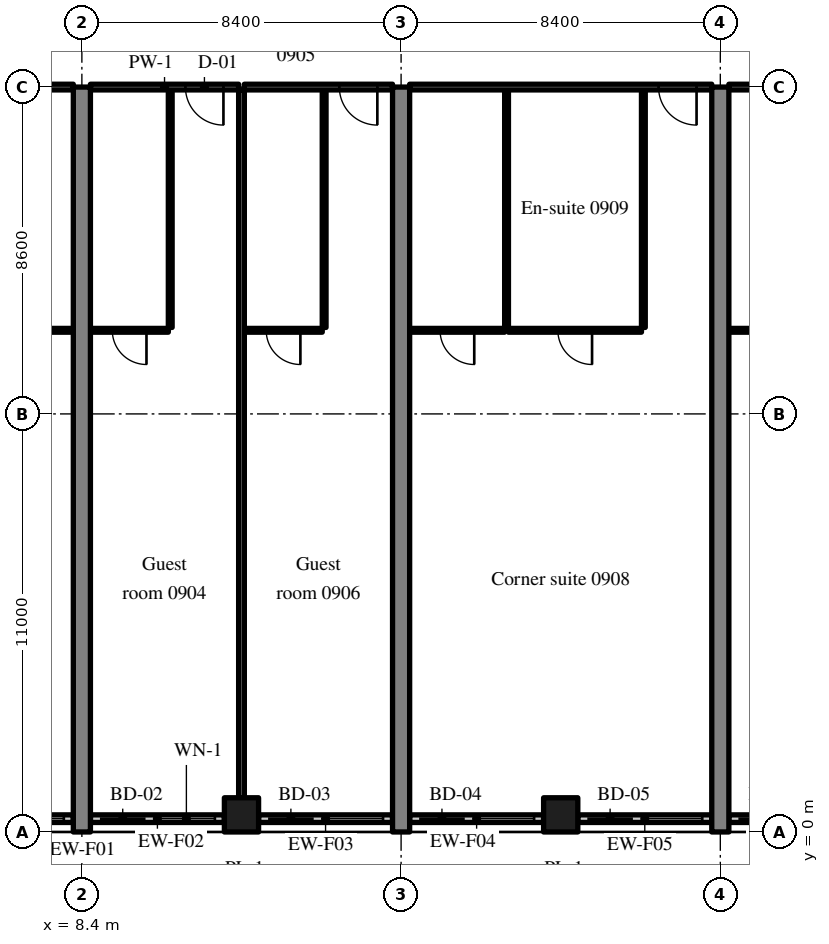
"""IFC4 building model, lengths in metres.
Left out: names, types, materials, properties, quantities, classifications, styles, units other than length and angle.
Written with IfcOpenShell. Run it as: python <this file> out.ifc"""

import sys

from ifc_helpers import new_model, si_unit, direction, frame, frame_2d, origin, origin_2d, place, context, subcontext, project, spatial, rectangle, extrude, source, transform, mapped, element, fill, save


model = new_model("IFC4")
c1 = context("Model", 3, precision=1e-05, world=origin(), true_north=direction((0.0, 1.0)))
c2 = subcontext(c1, "Body", "Model", "MODEL_VIEW")
j1 = project(units=[si_unit("LENGTHUNIT", "METRE"), si_unit("PLANEANGLEUNIT", "RADIAN")], contexts=[c1])
p1 = place(None, origin())
s1 = spatial("IfcSite", under=j1, at=p1, CompositionType="ELEMENT")
p2 = place(p1, origin())
s2 = spatial("IfcBuilding", under=s1, at=p2, CompositionType="ELEMENT")
p3 = place(p2, frame((0.0, 0.0, 43.0)))
s3 = spatial("IfcBuildingStorey", under=s2, at=p3, CompositionType="ELEMENT", Elevation=43.0)
m1 = source(origin(), c2, "Body", "SweptSolid", [
    extrude(rectangle(XDim=19.6, YDim=0.45, at=frame_2d((9.8, 0.0))), origin(), (0.0, 0.0, 1.0), 3.52),
])
for number, where, z_axis, x_axis in (
    (1, (8.4, 0.0, 0.0), (0.0, 0.0, 1.0), (0.0, 1.0, 0.0)),
    (2, (16.8, 0.0, 0.0), (0.0, 0.0, 1.0), (0.0, 1.0, 0.0)),
    (3, (25.2, 0.0, 0.0), (0.0, 0.0, 1.0), (0.0, 1.0, 0.0)),
):
    element("IfcWall", number, at=place(p3, frame(where, z_axis=z_axis, x_axis=x_axis)), inside=s3, PredefinedType="SHEAR", context=c2, shape_type="MappedRepresentation", body=[
        mapped(m1, transform((0.0, 0.0, 0.0), scale=1.0)),
    ])
m2 = source(origin(), c2, "Body", "SweptSolid", [
    extrude(rectangle(XDim=0.9, YDim=0.9, at=origin_2d()), origin(), (0.0, 0.0, 1.0), 3.52),
])
for number, where, z_axis, x_axis in (
    (4, (12.6, 0.45, 0.0), (0.0, 0.0, 1.0), (1.0, 0.0, 0.0)),
    (5, (21.0, 0.45, 0.0), (0.0, 0.0, 1.0), (1.0, 0.0, 0.0)),
):
    element("IfcColumn", number, at=place(p3, frame(where, z_axis=z_axis, x_axis=x_axis)), inside=s3, PredefinedType="COLUMN", context=c2, shape_type="MappedRepresentation", body=[
        mapped(m2, transform((0.0, 0.0, 0.0), scale=1.0)),
    ])
m3 = source(origin(), c2, "Body", "SweptSolid", [
    extrude(rectangle(XDim=4.03, YDim=0.2, at=frame_2d((2.015, 0.0))), origin(), (0.0, 0.0, 1.0), 2.82),
])
p4 = place(p3, frame((4.145, 0.35, 0.0), z_axis=(0.0, 0.0, 1.0), x_axis=(1.0, 0.0, 0.0)))
e6 = element("IfcWall", 6, at=p4, inside=s3, PredefinedType="SOLIDWALL", context=c2, shape_type="MappedRepresentation", body=[
    mapped(m3, transform((0.0, 0.0, 0.0), scale=1.0)),
])
m4 = source(origin(), c2, "Body", "SweptSolid", [
    extrude(rectangle(XDim=1.2, YDim=2.4, at=frame_2d((0.6, 1.2))), frame((0.0, 0.11, 0.0), z_axis=(0.0, -1.0, 0.0), x_axis=(1.0, 0.0, 0.0)), (0.0, 0.0, 1.0), 0.22),
])
p5 = place(p4, frame((0.25, 0.0, 0.0)))
e7 = element("IfcOpeningElement", 7, at=p5, cuts=e6, PredefinedType="OPENING", context=c2, shape_type="MappedRepresentation", body=[
    mapped(m4, transform((0.0, 0.0, 0.0), scale=1.0)),
])
m5 = source(origin(), c2, "Body", "SweptSolid", [
    extrude(rectangle(XDim=1.5, YDim=1.5, at=frame_2d((0.75, 0.75))), frame((0.0, 0.11, 0.0), z_axis=(0.0, -1.0, 0.0), x_axis=(1.0, 0.0, 0.0)), (0.0, 0.0, 1.0), 0.22),
])
p6 = place(p4, frame((2.28, 0.0, 0.9)))
e8 = element("IfcOpeningElement", 8, at=p6, cuts=e6, PredefinedType="OPENING", context=c2, shape_type="MappedRepresentation", body=[
    mapped(m5, transform((0.0, 0.0, 0.0), scale=1.0)),
])
m6 = source(origin(), c2, "Body", "SweptSolid", [
    extrude(rectangle(XDim=3.525, YDim=0.2, at=frame_2d((1.762, 0.0))), origin(), (0.0, 0.0, 1.0), 2.82),
])
p7 = place(p3, frame((8.625, 0.35, 0.0), z_axis=(0.0, 0.0, 1.0), x_axis=(1.0, 0.0, 0.0)))
e9 = element("IfcWall", 9, at=p7, inside=s3, PredefinedType="SOLIDWALL", context=c2, shape_type="MappedRepresentation", body=[
    mapped(m6, transform((0.0, 0.0, 0.0), scale=1.0)),
])
p8 = place(p7, frame((0.25, 0.0, 0.0)))
e10 = element("IfcOpeningElement", 10, at=p8, cuts=e9, PredefinedType="OPENING", context=c2, shape_type="MappedRepresentation", body=[
    mapped(m4, transform((0.0, 0.0, 0.0), scale=1.0)),
])
p9 = place(p7, frame((1.775, 0.0, 0.9)))
e11 = element("IfcOpeningElement", 11, at=p9, cuts=e9, PredefinedType="OPENING", context=c2, shape_type="MappedRepresentation", body=[
    mapped(m5, transform((0.0, 0.0, 0.0), scale=1.0)),
])
p10 = place(p3, frame((13.05, 0.35, 0.0), z_axis=(0.0, 0.0, 1.0), x_axis=(1.0, 0.0, 0.0)))
e12 = element("IfcWall", 12, at=p10, inside=s3, PredefinedType="SOLIDWALL", context=c2, shape_type="MappedRepresentation", body=[
    mapped(m6, transform((0.0, 0.0, 0.0), scale=1.0)),
])
p11 = place(p10, frame((0.25, 0.0, 0.0)))
e13 = element("IfcOpeningElement", 13, at=p11, cuts=e12, PredefinedType="OPENING", context=c2, shape_type="MappedRepresentation", body=[
    mapped(m4, transform((0.0, 0.0, 0.0), scale=1.0)),
])
p12 = place(p10, frame((1.775, 0.0, 0.9)))
e14 = element("IfcOpeningElement", 14, at=p12, cuts=e12, PredefinedType="OPENING", context=c2, shape_type="MappedRepresentation", body=[
    mapped(m5, transform((0.0, 0.0, 0.0), scale=1.0)),
])
m7 = source(origin(), c2, "Body", "SweptSolid", [
    extrude(rectangle(XDim=3.525, YDim=0.2, at=frame_2d((1.763, 0.0))), origin(), (0.0, 0.0, 1.0), 2.82),
])
p13 = place(p3, frame((17.025, 0.35, 0.0), z_axis=(0.0, 0.0, 1.0), x_axis=(1.0, 0.0, 0.0)))
e15 = element("IfcWall", 15, at=p13, inside=s3, PredefinedType="SOLIDWALL", context=c2, shape_type="MappedRepresentation", body=[
    mapped(m7, transform((0.0, 0.0, 0.0), scale=1.0)),
])
p14 = place(p13, frame((0.25, 0.0, 0.0)))
e16 = element("IfcOpeningElement", 16, at=p14, cuts=e15, PredefinedType="OPENING", context=c2, shape_type="MappedRepresentation", body=[
    mapped(m4, transform((0.0, 0.0, 0.0), scale=1.0)),
])
p15 = place(p13, frame((1.775, 0.0, 0.9)))
e17 = element("IfcOpeningElement", 17, at=p15, cuts=e15, PredefinedType="OPENING", context=c2, shape_type="MappedRepresentation", body=[
    mapped(m5, transform((0.0, 0.0, 0.0), scale=1.0)),
])
p16 = place(p3, frame((21.45, 0.35, 0.0), z_axis=(0.0, 0.0, 1.0), x_axis=(1.0, 0.0, 0.0)))
e18 = element("IfcWall", 18, at=p16, inside=s3, PredefinedType="SOLIDWALL", context=c2, shape_type="MappedRepresentation", body=[
    mapped(m7, transform((0.0, 0.0, 0.0), scale=1.0)),
])
p17 = place(p16, frame((0.25, 0.0, 0.0)))
e19 = element("IfcOpeningElement", 19, at=p17, cuts=e18, PredefinedType="OPENING", context=c2, shape_type="MappedRepresentation", body=[
    mapped(m4, transform((0.0, 0.0, 0.0), scale=1.0)),
])
p18 = place(p16, frame((1.775, 0.0, 0.9)))
e20 = element("IfcOpeningElement", 20, at=p18, cuts=e18, PredefinedType="OPENING", context=c2, shape_type="MappedRepresentation", body=[
    mapped(m5, transform((0.0, 0.0, 0.0), scale=1.0)),
])
p19 = place(p3, frame((25.425, 0.35, 0.0), z_axis=(0.0, 0.0, 1.0), x_axis=(1.0, 0.0, 0.0)))
e21 = element("IfcWall", 21, at=p19, inside=s3, PredefinedType="SOLIDWALL", context=c2, shape_type="MappedRepresentation", body=[
    mapped(m6, transform((0.0, 0.0, 0.0), scale=1.0)),
])
p20 = place(p19, frame((0.25, 0.0, 0.0)))
e22 = element("IfcOpeningElement", 22, at=p20, cuts=e21, PredefinedType="OPENING", context=c2, shape_type="MappedRepresentation", body=[
    mapped(m4, transform((0.0, 0.0, 0.0), scale=1.0)),
])
p21 = place(p19, frame((1.775, 0.0, 0.9)))
e23 = element("IfcOpeningElement", 23, at=p21, cuts=e21, PredefinedType="OPENING", context=c2, shape_type="MappedRepresentation", body=[
    mapped(m5, transform((0.0, 0.0, 0.0), scale=1.0)),
])
m8 = source(origin(), c2, "Body", "SweptSolid", [
    extrude(rectangle(XDim=2.275, YDim=0.1, at=frame_2d((1.138, 0.0))), origin(), (0.0, 0.0, 1.0), 3.52),
])
p22 = place(p3, frame((5.9, 13.2, 0.0), z_axis=(0.0, 0.0, 1.0), x_axis=(1.0, 0.0, 0.0)))
e24 = element("IfcWall", 24, at=p22, inside=s3, PredefinedType="PARTITIONING", context=c2, shape_type="MappedRepresentation", body=[
    mapped(m8, transform((0.0, 0.0, 0.0), scale=1.0)),
])
m9 = source(origin(), c2, "Body", "SweptSolid", [
    extrude(rectangle(XDim=0.9, YDim=2.1, at=frame_2d((0.45, 1.05))), frame((0.0, 0.06, 0.0), z_axis=(0.0, -1.0, 0.0), x_axis=(1.0, 0.0, 0.0)), (0.0, 0.0, 1.0), 0.12),
])
p23 = place(p22, frame((0.687, 0.0, 0.0)))
e25 = element("IfcOpeningElement", 25, at=p23, cuts=e24, PredefinedType="OPENING", context=c2, shape_type="MappedRepresentation", body=[
    mapped(m9, transform((0.0, 0.0, 0.0), scale=1.0)),
])
m10 = source(origin(), c2, "Body", "SweptSolid", [
    extrude(rectangle(XDim=7.725, YDim=0.15, at=frame_2d((3.863, 0.0))), origin(), (0.0, 0.0, 1.0), 2.82),
])
p24 = place(p3, frame((0.45, 19.6, 0.0), z_axis=(0.0, 0.0, 1.0), x_axis=(1.0, 0.0, 0.0)))
e26 = element("IfcWall", 26, at=p24, inside=s3, PredefinedType="PARTITIONING", context=c2, shape_type="MappedRepresentation", body=[
    mapped(m10, transform((0.0, 0.0, 0.0), scale=1.0)),
])
m11 = source(origin(), c2, "Body", "SweptSolid", [
    extrude(rectangle(XDim=1.0, YDim=2.1, at=frame_2d((0.5, 1.05))), frame((0.0, 0.085, 0.0), z_axis=(0.0, -1.0, 0.0), x_axis=(1.0, 0.0, 0.0)), (0.0, 0.0, 1.0), 0.17),
])
p25 = place(p24, frame((0.4, 0.0, 0.0)))
e27 = element("IfcOpeningElement", 27, at=p25, cuts=e26, PredefinedType="OPENING", context=c2, shape_type="MappedRepresentation", body=[
    mapped(m11, transform((0.0, 0.0, 0.0), scale=1.0)),
])
m12 = source(origin(), c2, "Body", "SweptSolid", [
    extrude(rectangle(XDim=6.25, YDim=0.1, at=frame_2d((3.125, 0.0))), origin(), (0.0, 0.0, 1.0), 3.52),
])
p26 = place(p3, frame((10.725, 13.275, 0.0), z_axis=(0.0, 0.0, 1.0), x_axis=(0.0, 1.0, 0.0)))
e28 = element("IfcWall", 28, at=p26, inside=s3, PredefinedType="PARTITIONING", context=c2, shape_type="MappedRepresentation", body=[
    mapped(m12, transform((0.0, 0.0, 0.0), scale=1.0)),
])
m13 = source(origin(), c2, "Body", "SweptSolid", [
    extrude(rectangle(XDim=2.05, YDim=0.1, at=frame_2d((1.025, 0.0))), origin(), (0.0, 0.0, 1.0), 3.52),
])
p27 = place(p3, frame((8.625, 13.2, 0.0), z_axis=(0.0, 0.0, 1.0), x_axis=(1.0, 0.0, 0.0)))
e29 = element("IfcWall", 29, at=p27, inside=s3, PredefinedType="PARTITIONING", context=c2, shape_type="MappedRepresentation", body=[
    mapped(m13, transform((0.0, 0.0, 0.0), scale=1.0)),
])
p28 = place(p27, frame((0.575, 0.0, 0.0)))
e30 = element("IfcOpeningElement", 30, at=p28, cuts=e29, PredefinedType="OPENING", context=c2, shape_type="MappedRepresentation", body=[
    mapped(m9, transform((0.0, 0.0, 0.0), scale=1.0)),
])
m14 = source(origin(), c2, "Body", "SweptSolid", [
    extrude(rectangle(XDim=3.9, YDim=0.15, at=frame_2d((1.95, 0.0))), origin(), (0.0, 0.0, 1.0), 2.82),
])
p29 = place(p3, frame((8.625, 19.6, 0.0), z_axis=(0.0, 0.0, 1.0), x_axis=(1.0, 0.0, 0.0)))
e31 = element("IfcWall", 31, at=p29, inside=s3, PredefinedType="PARTITIONING", context=c2, shape_type="MappedRepresentation", body=[
    mapped(m14, transform((0.0, 0.0, 0.0), scale=1.0)),
])
p30 = place(p29, frame((2.5, 0.0, 0.0)))
e32 = element("IfcOpeningElement", 32, at=p30, cuts=e31, PredefinedType="OPENING", context=c2, shape_type="MappedRepresentation", body=[
    mapped(m11, transform((0.0, 0.0, 0.0), scale=1.0)),
])
p31 = place(p3, frame((14.775, 13.275, 0.0), z_axis=(0.0, 0.0, 1.0), x_axis=(0.0, 1.0, 0.0)))
e33 = element("IfcWall", 33, at=p31, inside=s3, PredefinedType="PARTITIONING", context=c2, shape_type="MappedRepresentation", body=[
    mapped(m12, transform((0.0, 0.0, 0.0), scale=1.0)),
])
p32 = place(p3, frame((12.675, 13.2, 0.0), z_axis=(0.0, 0.0, 1.0), x_axis=(1.0, 0.0, 0.0)))
e34 = element("IfcWall", 34, at=p32, inside=s3, PredefinedType="PARTITIONING", context=c2, shape_type="MappedRepresentation", body=[
    mapped(m13, transform((0.0, 0.0, 0.0), scale=1.0)),
])
p33 = place(p32, frame((0.575, 0.0, 0.0)))
e35 = element("IfcOpeningElement", 35, at=p33, cuts=e34, PredefinedType="OPENING", context=c2, shape_type="MappedRepresentation", body=[
    mapped(m9, transform((0.0, 0.0, 0.0), scale=1.0)),
])
p34 = place(p3, frame((12.675, 19.6, 0.0), z_axis=(0.0, 0.0, 1.0), x_axis=(1.0, 0.0, 0.0)))
e36 = element("IfcWall", 36, at=p34, inside=s3, PredefinedType="PARTITIONING", context=c2, shape_type="MappedRepresentation", body=[
    mapped(m14, transform((0.0, 0.0, 0.0), scale=1.0)),
])
p35 = place(p34, frame((2.5, 0.0, 0.0)))
e37 = element("IfcOpeningElement", 37, at=p35, cuts=e36, PredefinedType="OPENING", context=c2, shape_type="MappedRepresentation", body=[
    mapped(m11, transform((0.0, 0.0, 0.0), scale=1.0)),
])
m15 = source(origin(), c2, "Body", "SweptSolid", [
    extrude(rectangle(XDim=18.625, YDim=0.15, at=frame_2d((9.312, 0.0))), origin(), (0.0, 0.0, 1.0), 3.52),
])
p36 = place(p3, frame((12.6, 0.9, 0.0), z_axis=(0.0, 0.0, 1.0), x_axis=(0.0, 1.0, 0.0)))
e38 = element("IfcWall", 38, at=p36, inside=s3, PredefinedType="PARTITIONING", context=c2, shape_type="MappedRepresentation", body=[
    mapped(m15, transform((0.0, 0.0, 0.0), scale=1.0)),
])
for number, where, z_axis, x_axis in (
    (39, (23.175, 13.275, 0.0), (0.0, 0.0, 1.0), (0.0, 1.0, 0.0)),
    (40, (19.575, 13.275, 0.0), (0.0, 0.0, 1.0), (0.0, 1.0, 0.0)),
):
    element("IfcWall", number, at=place(p3, frame(where, z_axis=z_axis, x_axis=x_axis)), inside=s3, PredefinedType="PARTITIONING", context=c2, shape_type="MappedRepresentation", body=[
        mapped(m12, transform((0.0, 0.0, 0.0), scale=1.0)),
    ])
m16 = source(origin(), c2, "Body", "SweptSolid", [
    extrude(rectangle(XDim=3.5, YDim=0.1, at=frame_2d((1.75, 0.0))), origin(), (0.0, 0.0, 1.0), 3.52),
])
p37 = place(p3, frame((19.625, 13.2, 0.0), z_axis=(0.0, 0.0, 1.0), x_axis=(1.0, 0.0, 0.0)))
e41 = element("IfcWall", 41, at=p37, inside=s3, PredefinedType="PARTITIONING", context=c2, shape_type="MappedRepresentation", body=[
    mapped(m16, transform((0.0, 0.0, 0.0), scale=1.0)),
])
p38 = place(p37, frame((1.3, 0.0, 0.0)))
e42 = element("IfcOpeningElement", 42, at=p38, cuts=e41, PredefinedType="OPENING", context=c2, shape_type="MappedRepresentation", body=[
    mapped(m9, transform((0.0, 0.0, 0.0), scale=1.0)),
])
m17 = source(origin(), c2, "Body", "SweptSolid", [
    extrude(rectangle(XDim=2.5, YDim=0.1, at=frame_2d((1.25, 0.0))), origin(), (0.0, 0.0, 1.0), 3.52),
])
p39 = place(p3, frame((17.025, 13.2, 0.0), z_axis=(0.0, 0.0, 1.0), x_axis=(1.0, 0.0, 0.0)))
e43 = element("IfcWall", 43, at=p39, inside=s3, PredefinedType="PARTITIONING", context=c2, shape_type="MappedRepresentation", body=[
    mapped(m17, transform((0.0, 0.0, 0.0), scale=1.0)),
])
p40 = place(p39, frame((0.8, 0.0, 0.0)))
e44 = element("IfcOpeningElement", 44, at=p40, cuts=e43, PredefinedType="OPENING", context=c2, shape_type="MappedRepresentation", body=[
    mapped(m9, transform((0.0, 0.0, 0.0), scale=1.0)),
])
m18 = source(origin(), c2, "Body", "SweptSolid", [
    extrude(rectangle(XDim=7.95, YDim=0.15, at=frame_2d((3.975, 0.0))), origin(), (0.0, 0.0, 1.0), 2.82),
])
p41 = place(p3, frame((17.025, 19.6, 0.0), z_axis=(0.0, 0.0, 1.0), x_axis=(1.0, 0.0, 0.0)))
e45 = element("IfcWall", 45, at=p41, inside=s3, PredefinedType="PARTITIONING", context=c2, shape_type="MappedRepresentation", body=[
    mapped(m18, transform((0.0, 0.0, 0.0), scale=1.0)),
])
p42 = place(p41, frame((6.55, 0.0, 0.0)))
e46 = element("IfcOpeningElement", 46, at=p42, cuts=e45, PredefinedType="OPENING", context=c2, shape_type="MappedRepresentation", body=[
    mapped(m11, transform((0.0, 0.0, 0.0), scale=1.0)),
])
p43 = place(p3, frame((25.425, 13.2, 0.0), z_axis=(0.0, 0.0, 1.0), x_axis=(1.0, 0.0, 0.0)))
e47 = element("IfcWall", 47, at=p43, inside=s3, PredefinedType="PARTITIONING", context=c2, shape_type="MappedRepresentation", body=[
    mapped(m17, transform((0.0, 0.0, 0.0), scale=1.0)),
])
p44 = place(p43, frame((0.8, 0.0, 0.0)))
e48 = element("IfcOpeningElement", 48, at=p44, cuts=e47, PredefinedType="OPENING", context=c2, shape_type="MappedRepresentation", body=[
    mapped(m9, transform((0.0, 0.0, 0.0), scale=1.0)),
])
m19 = source(origin(), c2, "Body", "SweptSolid", [
    extrude(rectangle(XDim=7.95, YDim=0.15, at=frame_2d((3.975, 0.0))), origin(), (0.0, 0.0, 1.0), 2.82),
])
p45 = place(p3, frame((25.425, 19.6, 0.0), z_axis=(0.0, 0.0, 1.0), x_axis=(1.0, 0.0, 0.0)))
e49 = element("IfcWall", 49, at=p45, inside=s3, PredefinedType="PARTITIONING", context=c2, shape_type="MappedRepresentation", body=[
    mapped(m19, transform((0.0, 0.0, 0.0), scale=1.0)),
])
p46 = place(p45, frame((6.55, 0.0, 0.0)))
e50 = element("IfcOpeningElement", 50, at=p46, cuts=e49, PredefinedType="OPENING", context=c2, shape_type="MappedRepresentation", body=[
    mapped(m11, transform((0.0, 0.0, 0.0), scale=1.0)),
])
m20 = source(origin(), c2, "Body", "SweptSolid", [
    extrude(rectangle(XDim=1.5, YDim=1.5, at=frame_2d((0.75, 0.75))), frame((0.0, 0.03, 0.0), z_axis=(0.0, -1.0, 0.0), x_axis=(1.0, 0.0, 0.0)), (0.0, 0.0, 1.0), 0.06),
])
p47 = place(p6, origin())
e51 = element("IfcWindow", 51, at=p47, inside=s3, PartitioningType="SINGLE_PANEL", PredefinedType="WINDOW", context=c2, shape_type="MappedRepresentation", body=[
    mapped(m20, transform((0.0, 0.0, 0.0), scale=1.0)),
])
fill(e8, e51)
m21 = source(origin(), c2, "Body", "SweptSolid", [
    extrude(rectangle(XDim=1.2, YDim=2.4, at=frame_2d((0.6, 1.2))), frame((0.0, 0.025, 0.0), z_axis=(0.0, -1.0, 0.0), x_axis=(1.0, 0.0, 0.0)), (0.0, 0.0, 1.0), 0.05),
])
p48 = place(p8, origin())
e52 = element("IfcDoor", 52, at=p48, inside=s3, OperationType="SLIDING_TO_RIGHT", PredefinedType="DOOR", context=c2, shape_type="MappedRepresentation", body=[
    mapped(m21, transform((0.0, 0.0, 0.0), scale=1.0)),
])
fill(e10, e52)
p49 = place(p9, origin())
e53 = element("IfcWindow", 53, at=p49, inside=s3, PartitioningType="SINGLE_PANEL", PredefinedType="WINDOW", context=c2, shape_type="MappedRepresentation", body=[
    mapped(m20, transform((0.0, 0.0, 0.0), scale=1.0)),
])
fill(e11, e53)
p50 = place(p11, origin())
e54 = element("IfcDoor", 54, at=p50, inside=s3, OperationType="SLIDING_TO_LEFT", PredefinedType="DOOR", context=c2, shape_type="MappedRepresentation", body=[
    mapped(m21, transform((0.0, 0.0, 0.0), scale=1.0)),
])
fill(e13, e54)
p51 = place(p12, origin())
e55 = element("IfcWindow", 55, at=p51, inside=s3, PartitioningType="SINGLE_PANEL", PredefinedType="WINDOW", context=c2, shape_type="MappedRepresentation", body=[
    mapped(m20, transform((0.0, 0.0, 0.0), scale=1.0)),
])
fill(e14, e55)
p52 = place(p14, origin())
e56 = element("IfcDoor", 56, at=p52, inside=s3, OperationType="SLIDING_TO_RIGHT", PredefinedType="DOOR", context=c2, shape_type="MappedRepresentation", body=[
    mapped(m21, transform((0.0, 0.0, 0.0), scale=1.0)),
])
fill(e16, e56)
p53 = place(p15, origin())
e57 = element("IfcWindow", 57, at=p53, inside=s3, PartitioningType="SINGLE_PANEL", PredefinedType="WINDOW", context=c2, shape_type="MappedRepresentation", body=[
    mapped(m20, transform((0.0, 0.0, 0.0), scale=1.0)),
])
fill(e17, e57)
p54 = place(p17, origin())
e58 = element("IfcDoor", 58, at=p54, inside=s3, OperationType="SLIDING_TO_LEFT", PredefinedType="DOOR", context=c2, shape_type="MappedRepresentation", body=[
    mapped(m21, transform((0.0, 0.0, 0.0), scale=1.0)),
])
fill(e19, e58)
p55 = place(p18, origin())
e59 = element("IfcWindow", 59, at=p55, inside=s3, PartitioningType="SINGLE_PANEL", PredefinedType="WINDOW", context=c2, shape_type="MappedRepresentation", body=[
    mapped(m20, transform((0.0, 0.0, 0.0), scale=1.0)),
])
fill(e20, e59)
p56 = place(p20, origin())
e60 = element("IfcDoor", 60, at=p56, inside=s3, OperationType="SLIDING_TO_RIGHT", PredefinedType="DOOR", context=c2, shape_type="MappedRepresentation", body=[
    mapped(m21, transform((0.0, 0.0, 0.0), scale=1.0)),
])
fill(e22, e60)
m22 = source(origin(), c2, "Body", "SweptSolid", [
    extrude(rectangle(XDim=0.9, YDim=2.1, at=frame_2d((0.45, 1.05))), frame((0.0, 0.025, 0.0), z_axis=(0.0, -1.0, 0.0), x_axis=(1.0, 0.0, 0.0)), (0.0, 0.0, 1.0), 0.05),
])
p57 = place(p28, origin())
e61 = element("IfcDoor", 61, at=p57, inside=s3, OperationType="SINGLE_SWING_RIGHT", PredefinedType="DOOR", context=c2, shape_type="MappedRepresentation", body=[
    mapped(m22, transform((0.0, 0.0, 0.0), scale=1.0)),
])
fill(e30, e61)
m23 = source(origin(), c2, "Body", "SweptSolid", [
    extrude(rectangle(XDim=1.0, YDim=2.1, at=frame_2d((0.5, 1.05))), frame((0.0, 0.025, 0.0), z_axis=(0.0, -1.0, 0.0), x_axis=(1.0, 0.0, 0.0)), (0.0, 0.0, 1.0), 0.05),
])
p58 = place(p30, origin())
e62 = element("IfcDoor", 62, at=p58, inside=s3, OperationType="SINGLE_SWING_RIGHT", PredefinedType="DOOR", context=c2, shape_type="MappedRepresentation", body=[
    mapped(m23, transform((0.0, 0.0, 0.0), scale=1.0)),
])
fill(e32, e62)
p59 = place(p33, origin())
e63 = element("IfcDoor", 63, at=p59, inside=s3, OperationType="SINGLE_SWING_RIGHT", PredefinedType="DOOR", context=c2, shape_type="MappedRepresentation", body=[
    mapped(m22, transform((0.0, 0.0, 0.0), scale=1.0)),
])
fill(e35, e63)
p60 = place(p35, origin())
e64 = element("IfcDoor", 64, at=p60, inside=s3, OperationType="SINGLE_SWING_RIGHT", PredefinedType="DOOR", context=c2, shape_type="MappedRepresentation", body=[
    mapped(m23, transform((0.0, 0.0, 0.0), scale=1.0)),
])
fill(e37, e64)
p61 = place(p38, origin())
e65 = element("IfcDoor", 65, at=p61, inside=s3, OperationType="SINGLE_SWING_RIGHT", PredefinedType="DOOR", context=c2, shape_type="MappedRepresentation", body=[
    mapped(m22, transform((0.0, 0.0, 0.0), scale=1.0)),
])
fill(e42, e65)
p62 = place(p40, origin())
e66 = element("IfcDoor", 66, at=p62, inside=s3, OperationType="SINGLE_SWING_RIGHT", PredefinedType="DOOR", context=c2, shape_type="MappedRepresentation", body=[
    mapped(m22, transform((0.0, 0.0, 0.0), scale=1.0)),
])
fill(e44, e66)
p63 = place(p42, origin())
e67 = element("IfcDoor", 67, at=p63, inside=s3, OperationType="SINGLE_SWING_RIGHT", PredefinedType="DOOR", context=c2, shape_type="MappedRepresentation", body=[
    mapped(m23, transform((0.0, 0.0, 0.0), scale=1.0)),
])
fill(e46, e67)
save(model, sys.argv[1])
